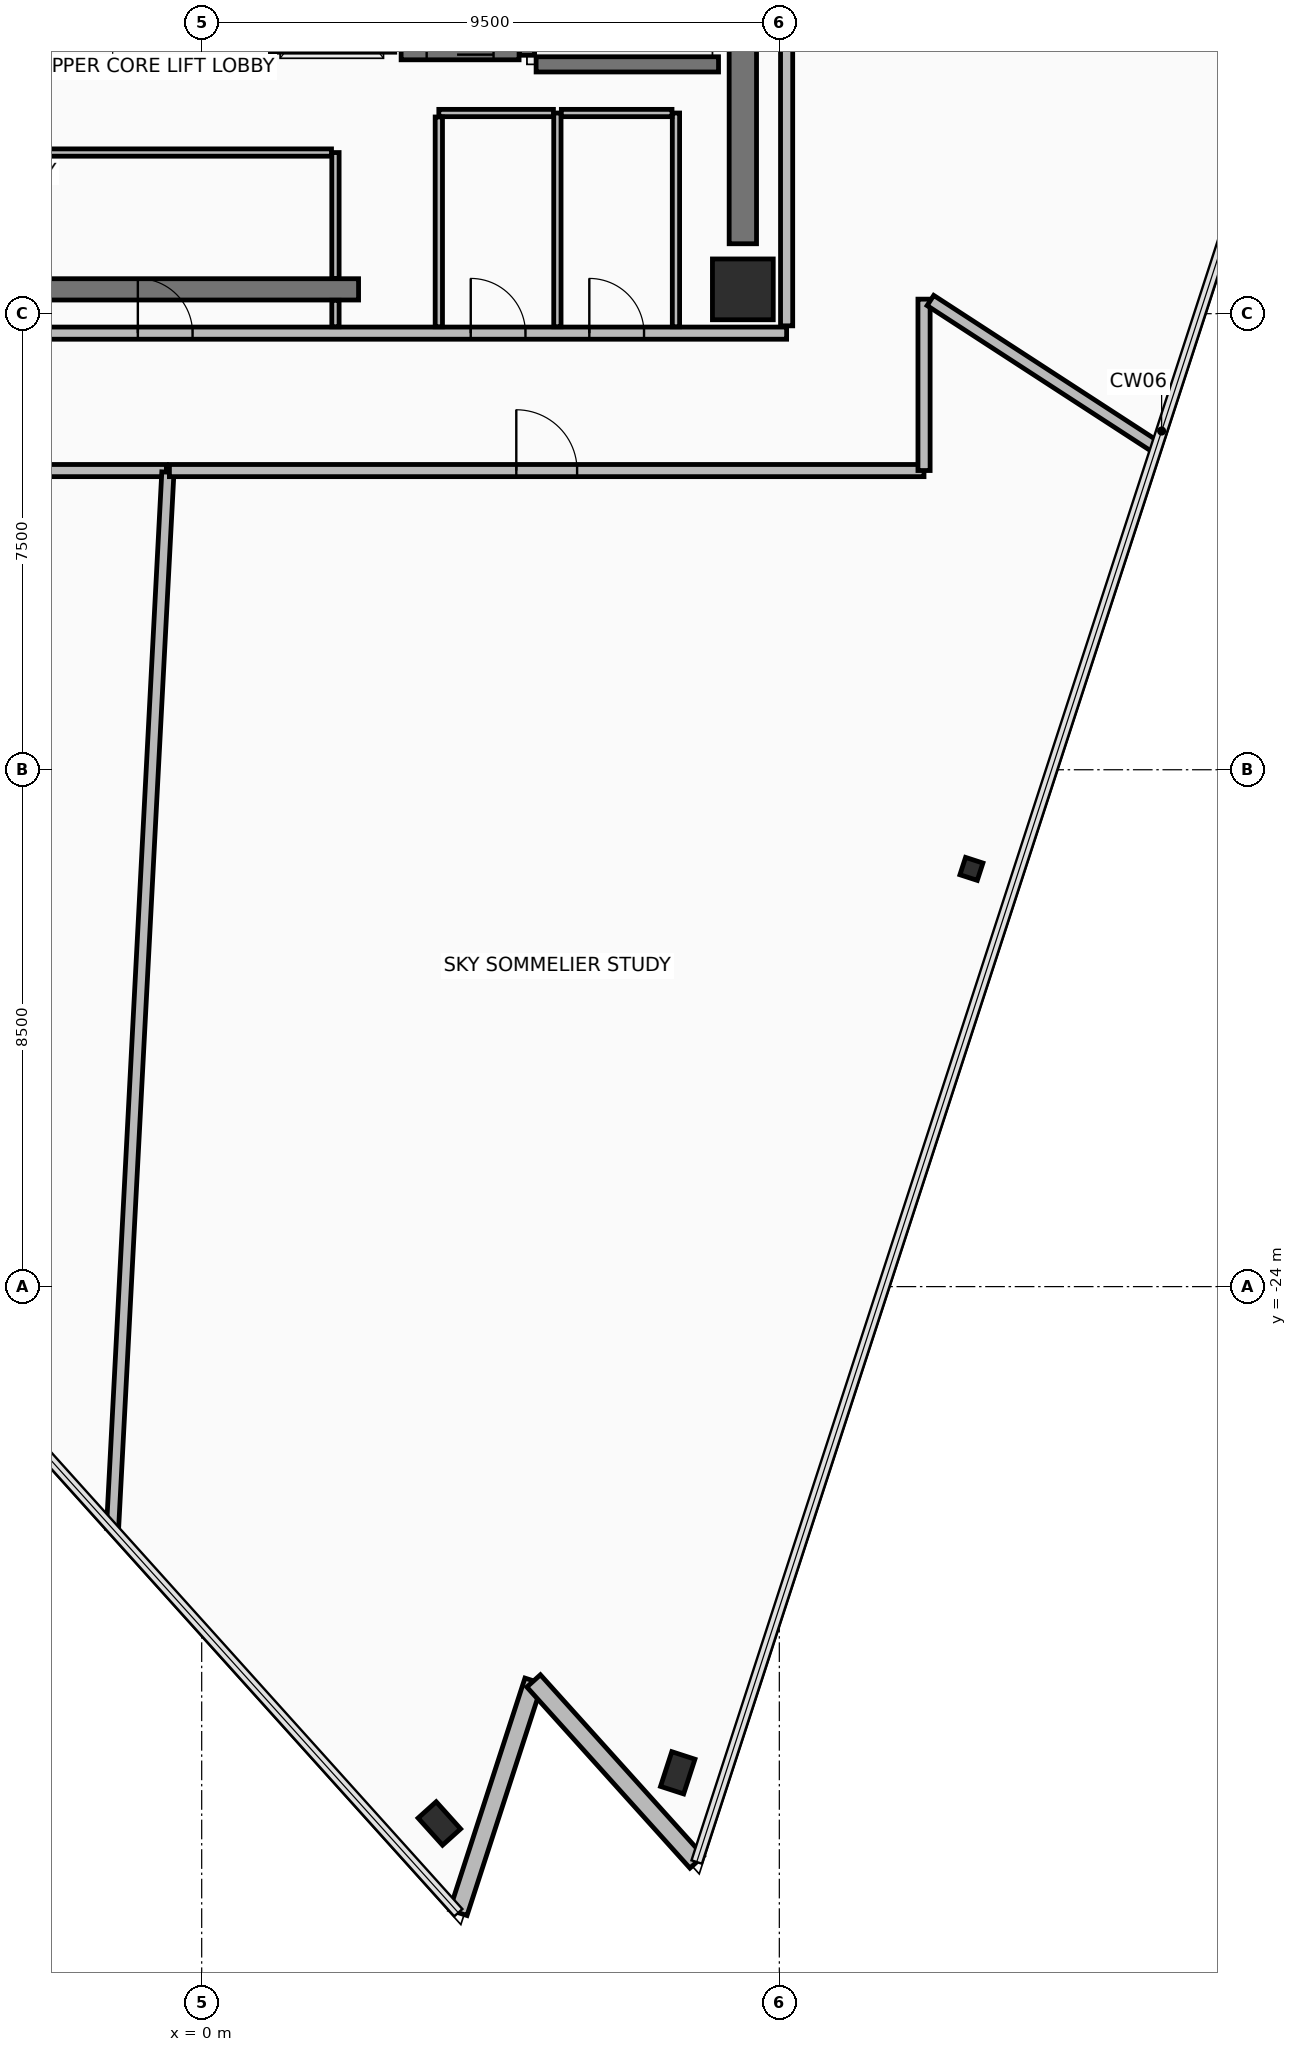
"""IFC4 building model, lengths in metres.
Left out: names, types, materials, properties, quantities, classifications, styles, units other than length and angle.
Written with IfcOpenShell. Run it as: python <this file> out.ifc"""

import sys

from ifc_helpers import new_model, si_unit, direction, frame, frame_2d, origin, origin_2d, place, context, subcontext, project, spatial, rectangle, hollow_rectangle, extrude, element, fill, save


model = new_model("IFC4")
c1 = context("Model", 3, precision=1e-05, world=origin(), true_north=direction((0.0, 1.0)))
c2 = subcontext(c1, "Body", "Model", "MODEL_VIEW")
j1 = project(units=[si_unit("LENGTHUNIT", "METRE"), si_unit("PLANEANGLEUNIT", "RADIAN")], contexts=[c1])
p1 = place(None, origin())
s1 = spatial("IfcSite", under=j1, at=p1, CompositionType="ELEMENT")
p2 = place(p1, origin())
s2 = spatial("IfcBuilding", under=s1, at=p2, CompositionType="ELEMENT")
p3 = place(p2, frame((0.0, 0.0, 298.0)))
s3 = spatial("IfcBuildingStorey", under=s2, at=p3, CompositionType="ELEMENT", Elevation=298.0)
p4 = place(p3, frame((8.9, -7.6, 0.0), z_axis=(0.0, 0.0, 1.0), x_axis=(1.0, 0.0, 0.0)))
e1 = element("IfcColumn", 1, at=p4, inside=s3, PredefinedType="COLUMN", context=c2, shape_type="SweptSolid", body=[
    extrude(rectangle(XDim=1.0, YDim=1.0, at=origin_2d()), origin(), (0.0, 0.0, 1.0), 4.15),
])
for number, where, z_axis, x_axis in (
    (2, (3.909, -32.829, 0.0), (0.0, 0.0, 1.0), (-0.669, 0.743, 0.0)),
    (3, (7.829, -31.996, 0.0), (0.0, 0.0, 1.0), (0.309, 0.951, 0.0)),
):
    element("IfcColumn", number, at=place(p3, frame(where, z_axis=z_axis, x_axis=x_axis)), inside=s3, PredefinedType="COLUMN", context=c2, shape_type="SweptSolid", body=[
        extrude(hollow_rectangle(XDim=0.4, YDim=0.6, WallThickness=0.03, at=origin_2d()), origin(), (0.0, 0.0, 1.0), 4.15),
    ])
p5 = place(p3, frame((12.659, -17.131, 0.0), z_axis=(0.0, 0.0, 1.0), x_axis=(0.309018654281, 0.951055976957, 0.0)))
e4 = element("IfcColumn", 4, at=p5, inside=s3, PredefinedType="COLUMN", context=c2, shape_type="SweptSolid", body=[
    extrude(hollow_rectangle(XDim=0.3, YDim=0.3, WallThickness=0.02, at=origin_2d()), origin(), (0.0, 0.0, 1.0), 4.15),
])
p6 = place(p3, frame((4.221, -34.296, 0.0), z_axis=(0.0, 0.0, 1.0), x_axis=(0.309018580232, 0.951056001018, 0.0)))
e5 = element("IfcWall", 5, at=p6, inside=s3, PredefinedType="STANDARD", context=c2, shape_type="SweptSolid", body=[
    extrude(rectangle(XDim=4.008, YDim=0.3, at=frame_2d((2.004, 0.0))), origin(), (0.0, 0.0, 1.0), 3.295),
])
p7 = place(p3, frame((5.459, -30.484, 0.0), z_axis=(0.0, 0.0, 1.0), x_axis=(0.669132983361, -0.743142685208, 0.0)))
e6 = element("IfcWall", 6, at=p7, inside=s3, PredefinedType="STANDARD", context=c2, shape_type="SweptSolid", body=[
    extrude(rectangle(XDim=4.008, YDim=0.3, at=frame_2d((2.004, 0.0))), origin(), (0.0, 0.0, 1.0), 3.295),
])
p8 = place(p3, frame((-2.8, -7.6, 0.0), z_axis=(0.0, 0.0, 1.0), x_axis=(1.0, 0.0, 0.0)))
e7 = element("IfcWall", 7, at=p8, inside=s3, PredefinedType="SHEAR", context=c2, shape_type="SweptSolid", body=[
    extrude(rectangle(XDim=5.38, YDim=0.35, at=frame_2d((2.69, 0.0))), origin(), (0.0, 0.0, 1.0), 3.95),
])
p9 = place(p3, frame((8.9, -6.85, 0.0), z_axis=(0.0, 0.0, 1.0), x_axis=(0.0, 1.0, 0.0)))
e8 = element("IfcWall", 8, at=p9, inside=s3, PredefinedType="SHEAR", context=c2, shape_type="SweptSolid", body=[
    extrude(rectangle(XDim=10.7, YDim=0.45, at=frame_2d((5.35, 0.0))), origin(), (0.0, 0.0, 1.0), 3.95),
])
p10 = place(p3, frame((-9.62, -8.32, 0.0), z_axis=(0.0, 0.0, 1.0), x_axis=(1.0, 0.0, 0.0)))
e9 = element("IfcWall", 9, at=p10, inside=s3, PredefinedType="PARTITIONING", context=c2, shape_type="SweptSolid", body=[
    extrude(rectangle(XDim=19.24, YDim=0.2, at=frame_2d((9.62, 0.0))), origin(), (0.0, 0.0, 1.0), 3.445),
])
p11 = place(p10, frame((8.57, 0.0, 0.0)))
e10 = element("IfcOpeningElement", 10, at=p11, cuts=e9, PredefinedType="OPENING", context=c2, shape_type="SweptSolid", body=[
    extrude(rectangle(XDim=0.9, YDim=2.1, at=frame_2d((0.45, 1.05))), frame((0.0, 0.11, 0.0), z_axis=(0.0, -1.0, 0.0), x_axis=(1.0, 0.0, 0.0)), (0.0, 0.0, 1.0), 0.22),
])
p12 = place(p10, frame((14.045, 0.0, 0.0)))
e11 = element("IfcOpeningElement", 11, at=p12, cuts=e9, PredefinedType="OPENING", context=c2, shape_type="SweptSolid", body=[
    extrude(rectangle(XDim=0.9, YDim=2.1, at=frame_2d((0.45, 1.05))), frame((0.0, 0.11, 0.0), z_axis=(0.0, -1.0, 0.0), x_axis=(1.0, 0.0, 0.0)), (0.0, 0.0, 1.0), 0.22),
])
p13 = place(p10, frame((15.995, 0.0, 0.0)))
e12 = element("IfcOpeningElement", 12, at=p13, cuts=e9, PredefinedType="OPENING", context=c2, shape_type="SweptSolid", body=[
    extrude(rectangle(XDim=0.9, YDim=2.1, at=frame_2d((0.45, 1.05))), frame((0.0, 0.11, 0.0), z_axis=(0.0, -1.0, 0.0), x_axis=(1.0, 0.0, 0.0)), (0.0, 0.0, 1.0), 0.22),
])
p14 = place(p3, frame((9.62, -8.2, 0.0), z_axis=(0.0, 0.0, 1.0), x_axis=(0.0, 1.0, 0.0)))
e13 = element("IfcWall", 13, at=p14, inside=s3, PredefinedType="PARTITIONING", context=c2, shape_type="SweptSolid", body=[
    extrude(rectangle(XDim=16.4, YDim=0.2, at=frame_2d((8.2, 0.0))), origin(), (0.0, 0.0, 1.0), 3.445),
])
p15 = place(p14, frame((12.65, 0.0, 0.0)))
e14 = element("IfcOpeningElement", 14, at=p15, cuts=e13, PredefinedType="OPENING", context=c2, shape_type="SweptSolid", body=[
    extrude(rectangle(XDim=1.1, YDim=2.15, at=frame_2d((0.55, 1.075))), frame((0.0, 0.11, 0.0), z_axis=(0.0, -1.0, 0.0), x_axis=(1.0, 0.0, 0.0)), (0.0, 0.0, 1.0), 0.22),
])
p16 = place(p3, frame((5.35, -3.75, 0.0), z_axis=(0.0, 0.0, 1.0), x_axis=(0.0, 1.0, 0.0)))
e15 = element("IfcWall", 15, at=p16, inside=s3, PredefinedType="SHEAR", context=c2, shape_type="SweptSolid", body=[
    extrude(rectangle(XDim=7.3, YDim=0.25, at=frame_2d((3.65, 0.0))), origin(), (0.0, 0.0, 1.0), 3.95),
])
p17 = place(p3, frame((5.5, -3.9, 0.0), z_axis=(0.0, 0.0, 1.0), x_axis=(1.0, 0.0, 0.0)))
e16 = element("IfcWall", 16, at=p17, inside=s3, PredefinedType="SHEAR", context=c2, shape_type="SweptSolid", body=[
    extrude(rectangle(XDim=3.0, YDim=0.25, at=frame_2d((1.5, 0.0))), origin(), (0.0, 0.0, 1.0), 3.95),
])
p18 = place(p3, frame((1.13, -3.6, 0.0), z_axis=(0.0, 0.0, 1.0), x_axis=(1.0, 0.0, 0.0)))
e17 = element("IfcWall", 17, at=p18, inside=s3, PredefinedType="PARTITIONING", context=c2, shape_type="SweptSolid", body=[
    extrude(rectangle(XDim=2.045, YDim=0.2, at=frame_2d((1.022, 0.0))), origin(), (0.0, 0.0, 1.0), 3.95),
])
p19 = place(p3, frame((3.28, -3.7, 0.0), z_axis=(0.0, 0.0, 1.0), x_axis=(1.0, 0.0, 0.0)))
e18 = element("IfcWall", 18, at=p19, inside=s3, PredefinedType="SHEAR", context=c2, shape_type="SweptSolid", body=[
    extrude(rectangle(XDim=1.94, YDim=0.25, at=frame_2d((0.97, 0.0))), origin(), (0.0, 0.0, 1.0), 3.95),
])
p20 = place(p19, frame((0.42, 0.0, 0.0)))
e19 = element("IfcOpeningElement", 19, at=p20, cuts=e18, PredefinedType="OPENING", context=c2, shape_type="SweptSolid", body=[
    extrude(rectangle(XDim=1.1, YDim=2.2, at=frame_2d((0.55, 1.1))), frame((0.0, 0.135, 0.0), z_axis=(0.0, -1.0, 0.0), x_axis=(1.0, 0.0, 0.0)), (0.0, 0.0, 1.0), 0.27),
])
p21 = place(p3, frame((2.2, -8.215, 0.0), z_axis=(0.0, 0.0, 1.0), x_axis=(0.0, 1.0, 0.0)))
e20 = element("IfcWall", 20, at=p21, inside=s3, PredefinedType="PARTITIONING", context=c2, shape_type="SweptSolid", body=[
    extrude(rectangle(XDim=0.435, YDim=0.12, at=frame_2d((0.218, 0.0))), origin(), (0.0, 0.0, 1.0), 3.245),
])
p22 = place(p3, frame((2.2, -7.42, 0.0), z_axis=(0.0, 0.0, 1.0), x_axis=(0.0, 1.0, 0.0)))
e21 = element("IfcWall", 21, at=p22, inside=s3, PredefinedType="PARTITIONING", context=c2, shape_type="SweptSolid", body=[
    extrude(rectangle(XDim=2.07, YDim=0.12, at=frame_2d((1.035, 0.0))), origin(), (0.0, 0.0, 1.0), 3.245),
])
p23 = place(p3, frame((2.135, -5.35, 0.0), z_axis=(0.0, 0.0, 1.0), x_axis=(-1.0, 0.0, 0.0)))
e22 = element("IfcWall", 22, at=p23, inside=s3, PredefinedType="PARTITIONING", context=c2, shape_type="SweptSolid", body=[
    extrude(rectangle(XDim=5.535, YDim=0.12, at=frame_2d((2.768, 0.0))), origin(), (0.0, 0.0, 1.0), 3.245),
])
p24 = place(p3, frame((5.85, -8.215, 0.0), z_axis=(0.0, 0.0, 1.0), x_axis=(0.0, 1.0, 0.0)))
e23 = element("IfcWall", 23, at=p24, inside=s3, PredefinedType="PARTITIONING", context=c2, shape_type="SweptSolid", body=[
    extrude(rectangle(XDim=3.515, YDim=0.12, at=frame_2d((1.758, 0.0))), origin(), (0.0, 0.0, 1.0), 3.245),
])
p25 = place(p3, frame((5.785, -4.7, 0.0), z_axis=(0.0, 0.0, 1.0), x_axis=(-1.0, 0.0, 0.0)))
e24 = element("IfcWall", 24, at=p25, inside=s3, PredefinedType="PARTITIONING", context=c2, shape_type="SweptSolid", body=[
    extrude(rectangle(XDim=1.885, YDim=0.12, at=frame_2d((0.942, 0.0))), origin(), (0.0, 0.0, 1.0), 3.95),
])
p26 = place(p3, frame((3.9, -4.765, 0.0), z_axis=(0.0, 0.0, 1.0), x_axis=(0.0, -1.0, 0.0)))
e25 = element("IfcWall", 25, at=p26, inside=s3, PredefinedType="PARTITIONING", context=c2, shape_type="SweptSolid", body=[
    extrude(rectangle(XDim=3.45, YDim=0.12, at=frame_2d((1.725, 0.0))), origin(), (0.0, 0.0, 1.0), 3.245),
])
p27 = place(p3, frame((7.8, -8.215, 0.0), z_axis=(0.0, 0.0, 1.0), x_axis=(0.0, 1.0, 0.0)))
e26 = element("IfcWall", 26, at=p27, inside=s3, PredefinedType="PARTITIONING", context=c2, shape_type="SweptSolid", body=[
    extrude(rectangle(XDim=3.515, YDim=0.12, at=frame_2d((1.758, 0.0))), origin(), (0.0, 0.0, 1.0), 3.245),
])
p28 = place(p3, frame((7.735, -4.7, 0.0), z_axis=(0.0, 0.0, 1.0), x_axis=(-1.0, 0.0, 0.0)))
e27 = element("IfcWall", 27, at=p28, inside=s3, PredefinedType="PARTITIONING", context=c2, shape_type="SweptSolid", body=[
    extrude(rectangle(XDim=1.82, YDim=0.12, at=frame_2d((0.91, 0.0))), origin(), (0.0, 0.0, 1.0), 3.95),
])
p29 = place(p3, frame((-11.879, -10.58, 0.0), z_axis=(0.0, 0.0, 1.0), x_axis=(1.0, 0.0, 0.0)))
e28 = element("IfcWall", 28, at=p29, inside=s3, PredefinedType="PARTITIONING", context=c2, shape_type="SweptSolid", body=[
    extrude(rectangle(XDim=11.299, YDim=0.2, at=frame_2d((5.649, 0.0))), origin(), (0.0, 0.0, 1.0), 3.445),
])
p30 = place(p29, frame((5.199, 0.0, 0.0)))
e29 = element("IfcOpeningElement", 29, at=p30, cuts=e28, PredefinedType="OPENING", context=c2, shape_type="SweptSolid", body=[
    extrude(rectangle(XDim=0.9, YDim=2.1, at=frame_2d((0.45, 1.05))), frame((0.0, 0.11, 0.0), z_axis=(0.0, -1.0, 0.0), x_axis=(1.0, 0.0, 0.0)), (0.0, 0.0, 1.0), 0.22),
])
p31 = place(p3, frame((-0.556, -10.606, 0.0), z_axis=(0.0, 0.0, 1.0), x_axis=(-0.052329765113, -0.998629859199, 0.0)))
e30 = element("IfcWall", 30, at=p31, inside=s3, PredefinedType="PARTITIONING", context=c2, shape_type="SweptSolid", body=[
    extrude(rectangle(XDim=17.397, YDim=0.2, at=frame_2d((8.699, 0.0))), origin(), (0.0, 0.0, 1.0), 3.295),
])
p32 = place(p3, frame((-0.531, -10.58, 0.0), z_axis=(0.0, 0.0, 1.0), x_axis=(1.0, 0.0, 0.0)))
e31 = element("IfcWall", 31, at=p32, inside=s3, PredefinedType="PARTITIONING", context=c2, shape_type="SweptSolid", body=[
    extrude(rectangle(XDim=12.41, YDim=0.2, at=frame_2d((6.205, 0.0))), origin(), (0.0, 0.0, 1.0), 3.445),
])
p33 = place(p32, frame((5.705, 0.0, 0.0)))
e32 = element("IfcOpeningElement", 32, at=p33, cuts=e31, PredefinedType="OPENING", context=c2, shape_type="SweptSolid", body=[
    extrude(rectangle(XDim=1.0, YDim=2.15, at=frame_2d((0.5, 1.075))), frame((0.0, 0.11, 0.0), z_axis=(0.0, -1.0, 0.0), x_axis=(1.0, 0.0, 0.0)), (0.0, 0.0, 1.0), 0.22),
])
p34 = place(p3, frame((11.88, -10.579, 0.0), z_axis=(0.0, 0.0, 1.0), x_axis=(0.0, 1.0, 0.0)))
e33 = element("IfcWall", 33, at=p34, inside=s3, PredefinedType="PARTITIONING", context=c2, shape_type="SweptSolid", body=[
    extrude(rectangle(XDim=2.818, YDim=0.2, at=frame_2d((1.409, 0.0))), origin(), (0.0, 0.0, 1.0), 3.705),
])
p35 = place(p3, frame((11.985, -7.783, 0.0), z_axis=(0.0, 0.0, 1.0), x_axis=(0.838673668882, -0.544634259962, 0.0)))
e34 = element("IfcWall", 34, at=p35, inside=s3, PredefinedType="PARTITIONING", context=c2, shape_type="SweptSolid", body=[
    extrude(rectangle(XDim=4.411, YDim=0.2, at=frame_2d((2.206, 0.0))), origin(), (0.0, 0.0, 1.0), 3.295),
])
p36 = place(p20, origin())
e35 = element("IfcDoor", 35, at=p36, inside=s3, OperationType="SLIDING_TO_LEFT", PredefinedType="DOOR", context=c2, shape_type="SweptSolid", body=[
    extrude(rectangle(XDim=1.1, YDim=2.2, at=frame_2d((0.55, 1.1))), frame((0.0, 0.025, 0.0), z_axis=(0.0, -1.0, 0.0), x_axis=(1.0, 0.0, 0.0)), (0.0, 0.0, 1.0), 0.05),
])
fill(e19, e35)
p37 = place(p11, origin())
e36 = element("IfcDoor", 36, at=p37, inside=s3, OperationType="SINGLE_SWING_LEFT", PredefinedType="DOOR", context=c2, shape_type="SweptSolid", body=[
    extrude(rectangle(XDim=0.9, YDim=2.1, at=frame_2d((0.45, 1.05))), frame((0.0, 0.025, 0.0), z_axis=(0.0, -1.0, 0.0), x_axis=(1.0, 0.0, 0.0)), (0.0, 0.0, 1.0), 0.05),
])
fill(e10, e36)
p38 = place(p12, origin())
e37 = element("IfcDoor", 37, at=p38, inside=s3, OperationType="SINGLE_SWING_LEFT", PredefinedType="DOOR", context=c2, shape_type="SweptSolid", body=[
    extrude(rectangle(XDim=0.9, YDim=2.1, at=frame_2d((0.45, 1.05))), frame((0.0, 0.025, 0.0), z_axis=(0.0, -1.0, 0.0), x_axis=(1.0, 0.0, 0.0)), (0.0, 0.0, 1.0), 0.05),
])
fill(e11, e37)
p39 = place(p13, origin())
e38 = element("IfcDoor", 38, at=p39, inside=s3, OperationType="SINGLE_SWING_LEFT", PredefinedType="DOOR", context=c2, shape_type="SweptSolid", body=[
    extrude(rectangle(XDim=0.9, YDim=2.1, at=frame_2d((0.45, 1.05))), frame((0.0, 0.025, 0.0), z_axis=(0.0, -1.0, 0.0), x_axis=(1.0, 0.0, 0.0)), (0.0, 0.0, 1.0), 0.05),
])
fill(e12, e38)
p40 = place(p33, origin())
e39 = element("IfcDoor", 39, at=p40, inside=s3, OperationType="SINGLE_SWING_RIGHT", PredefinedType="DOOR", context=c2, shape_type="SweptSolid", body=[
    extrude(rectangle(XDim=1.0, YDim=2.15, at=frame_2d((0.5, 1.075))), frame((0.0, 0.025, 0.0), z_axis=(0.0, -1.0, 0.0), x_axis=(1.0, 0.0, 0.0)), (0.0, 0.0, 1.0), 0.05),
])
fill(e32, e39)
save(model, sys.argv[1])
